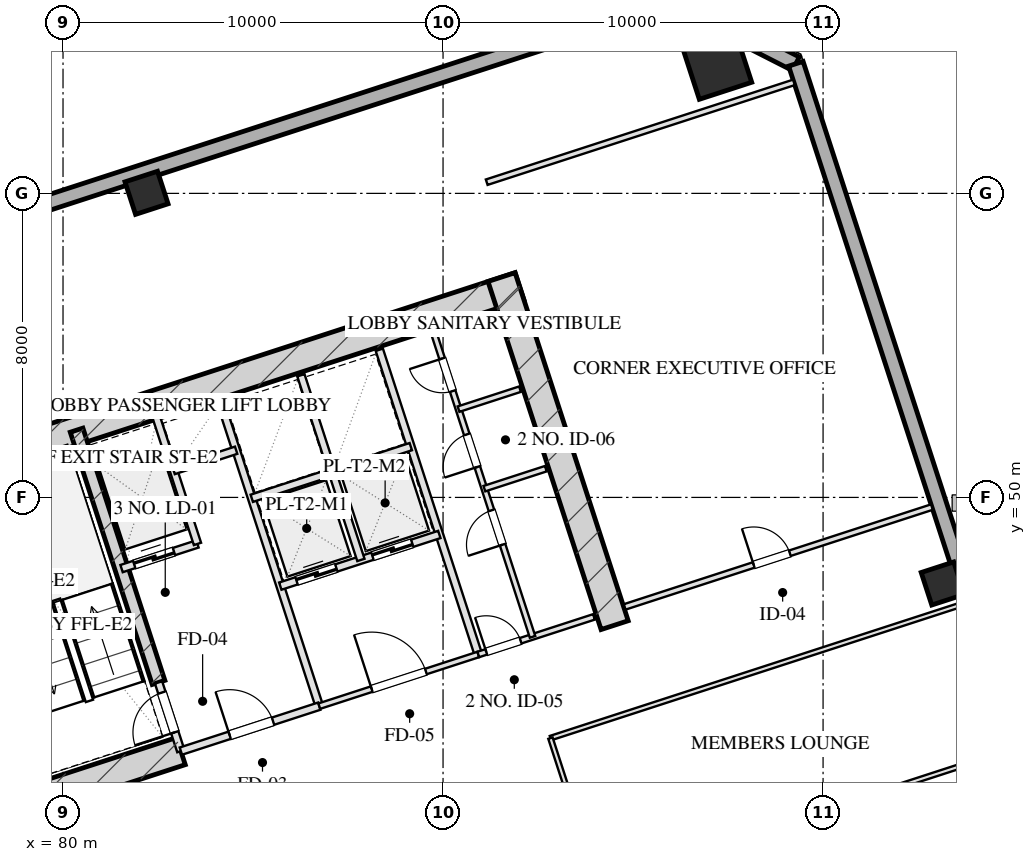
"""IFC4 building model, lengths in metres.
Left out: names, types, materials, properties, quantities, classifications, styles, units other than length and angle.
Written with IfcOpenShell. Run it as: python <this file> out.ifc"""

import sys

from ifc_helpers import new_model, si_unit, direction, frame, frame_2d, origin, origin_2d, place, context, subcontext, project, spatial, rectangle, hollow_rectangle, extrude, element, fill, save


model = new_model("IFC4")
c1 = context("Model", 3, precision=1e-05, world=origin(), true_north=direction((0.0, 1.0)))
c2 = subcontext(c1, "Body", "Model", "MODEL_VIEW")
j1 = project(units=[si_unit("LENGTHUNIT", "METRE"), si_unit("PLANEANGLEUNIT", "RADIAN")], contexts=[c1])
p1 = place(None, origin())
s1 = spatial("IfcSite", under=j1, at=p1, CompositionType="ELEMENT")
p2 = place(p1, origin())
s2 = spatial("IfcBuilding", under=s1, at=p2, CompositionType="ELEMENT")
p3 = place(p2, frame((0.0, 0.0, 88.55)))
s3 = spatial("IfcBuildingStorey", under=s2, at=p3, CompositionType="ELEMENT", Elevation=88.55)
p4 = place(p3, frame((76.272, 50.443, 0.0), z_axis=(0.0, 0.0, 1.0), x_axis=(0.951056072937, 0.309018358888, 0.0)))
e1 = element("IfcWall", 1, at=p4, inside=s3, PredefinedType="SHEAR", context=c2, shape_type="SweptSolid", body=[
    extrude(rectangle(XDim=16.55, YDim=0.75, at=frame_2d((8.275, 0.0))), origin(), (0.0, 0.0, 1.0), 3.45),
])
for number, where, z_axis, x_axis in (
    (2, (79.489, 41.756, 0.0), (0.0, 0.0, 1.0), (-0.309, 0.951, 0.0)),
    (3, (94.515, 46.639, 0.0), (0.0, 0.0, 1.0), (-0.309, 0.951, 0.0)),
):
    element("IfcWall", number, at=place(p3, frame(where, z_axis=z_axis, x_axis=x_axis)), inside=s3, PredefinedType="SHEAR", context=c2, shape_type="SweptSolid", body=[
        extrude(rectangle(XDim=9.63, YDim=0.75, at=frame_2d((4.815, 0.0))), origin(), (0.0, 0.0, 1.0), 3.45),
    ])
p5 = place(p3, frame((82.514, 45.131, 0.0), z_axis=(0.0, 0.0, 1.0), x_axis=(-0.308988790936, 0.951065679686, 0.0)))
e4 = element("IfcWall", 4, at=p5, inside=s3, PredefinedType="SHEAR", context=c2, shape_type="SweptSolid", body=[
    extrude(rectangle(XDim=6.98, YDim=0.35, at=frame_2d((3.49, 0.0))), origin(), (0.0, 0.0, 1.0), 3.45),
])
p6 = place(p3, frame((79.016, 41.997, 0.0), z_axis=(0.0, 0.0, 1.0), x_axis=(0.95106038264, 0.309005094736, 0.0)))
e5 = element("IfcWall", 5, at=p6, inside=s3, PredefinedType="SHEAR", context=c2, shape_type="SweptSolid", body=[
    extrude(rectangle(XDim=4.295, YDim=0.75, at=frame_2d((2.147, 0.0))), origin(), (0.0, 0.0, 1.0), 3.45),
])
p7 = place(p3, frame((97.209, 61.388, 0.0), z_axis=(0.0, 0.0, 1.0), x_axis=(0.951056516295, 0.309016994375, 0.0)))
e6 = element("IfcColumn", 6, at=p7, inside=s3, PredefinedType="COLUMN", context=c2, shape_type="SweptSolid", body=[
    extrude(hollow_rectangle(XDim=1.45, YDim=1.45, WallThickness=0.05, at=origin_2d()), origin(), (0.0, 0.0, 1.0), 3.451),
])
for number, where, z_axis, x_axis in (
    (7, (103.149, 47.736, 0.0), (0.0, 0.0, 1.0), (0.951, 0.309, 0.0)),
    (8, (82.197, 58.014, 0.0), (0.0, 0.0, 1.0), (0.951, 0.309, 0.0)),
):
    element("IfcColumn", number, at=place(p3, frame(where, z_axis=z_axis, x_axis=x_axis)), inside=s3, PredefinedType="COLUMN", context=c2, shape_type="SweptSolid", body=[
        extrude(hollow_rectangle(XDim=0.9, YDim=0.9, WallThickness=0.032, at=origin_2d()), origin(), (0.0, 0.0, 1.0), 3.451),
    ])
p8 = place(p3, frame((80.716, 6.59, 0.0), z_axis=(0.0, 0.0, 1.0), x_axis=(-0.309017542002, 0.95105633836, 0.0)))
e9 = element("IfcWall", 9, at=p8, inside=s3, PredefinedType="SOLIDWALL", context=c2, shape_type="SweptSolid", body=[
    extrude(rectangle(XDim=46.4, YDim=0.4, at=frame_2d((23.2, 0.0))), origin(), (0.0, 0.0, 1.0), 2.55),
])
p9 = place(p8, frame((28.4, 0.0, 0.75)))
e10 = element("IfcOpeningElement", 10, at=p9, cuts=e9, PredefinedType="OPENING", context=c2, shape_type="SweptSolid", body=[
    extrude(rectangle(XDim=2.4, YDim=1.4, at=frame_2d((1.2, 0.7))), frame((0.0, 0.21, 0.0), z_axis=(0.0, -1.0, 0.0), x_axis=(1.0, 0.0, 0.0)), (0.0, 0.0, 1.0), 0.42),
])
p10 = place(p8, frame((19.55, 0.0, 0.0)))
e11 = element("IfcOpeningElement", 11, at=p10, cuts=e9, PredefinedType="OPENING", context=c2, shape_type="SweptSolid", body=[
    extrude(rectangle(XDim=1.1, YDim=2.15, at=frame_2d((0.55, 1.075))), frame((0.0, 0.21, 0.0), z_axis=(0.0, -1.0, 0.0), x_axis=(1.0, 0.0, 0.0)), (0.0, 0.0, 1.0), 0.42),
])
p11 = place(p3, frame((68.047, 53.995, 0.0), z_axis=(0.0, 0.0, 1.0), x_axis=(0.95105505922, 0.309021478754, 0.0)))
e12 = element("IfcWall", 12, at=p11, inside=s3, PredefinedType="SOLIDWALL", context=c2, shape_type="SweptSolid", body=[
    extrude(rectangle(XDim=29.4, YDim=0.4, at=frame_2d((14.7, 0.0))), origin(), (0.0, 0.0, 1.0), 2.55),
])
p12 = place(p3, frame((96.008, 63.08, 0.0), z_axis=(0.0, 0.0, 1.0), x_axis=(0.891001999643, -0.45399937955, 0.0)))
e13 = element("IfcWall", 13, at=p12, inside=s3, PredefinedType="SOLIDWALL", context=c2, shape_type="SweptSolid", body=[
    extrude(rectangle(XDim=3.677, YDim=0.4, at=frame_2d((1.839, 0.0))), origin(), (0.0, 0.0, 1.0), 2.55),
])
p13 = place(p3, frame((99.284, 61.41, 0.0), z_axis=(0.0, 0.0, 1.0), x_axis=(0.309017542002, -0.95105633836, 0.0)))
e14 = element("IfcWall", 14, at=p13, inside=s3, PredefinedType="SOLIDWALL", context=c2, shape_type="SweptSolid", body=[
    extrude(rectangle(XDim=46.4, YDim=0.4, at=frame_2d((23.2, 0.0))), origin(), (0.0, 0.0, 1.0), 2.55),
])
p14 = place(p13, frame((19.4, 0.0, 0.75)))
e15 = element("IfcOpeningElement", 15, at=p14, cuts=e14, PredefinedType="OPENING", context=c2, shape_type="SweptSolid", body=[
    extrude(rectangle(XDim=2.4, YDim=1.4, at=frame_2d((1.2, 0.7))), frame((0.0, 0.21, 0.0), z_axis=(0.0, -1.0, 0.0), x_axis=(1.0, 0.0, 0.0)), (0.0, 0.0, 1.0), 0.42),
])
p15 = place(p13, frame((15.6, 0.0, 0.75)))
e16 = element("IfcOpeningElement", 16, at=p15, cuts=e14, PredefinedType="OPENING", context=c2, shape_type="SweptSolid", body=[
    extrude(rectangle(XDim=2.4, YDim=1.4, at=frame_2d((1.2, 0.7))), frame((0.0, 0.21, 0.0), z_axis=(0.0, -1.0, 0.0), x_axis=(1.0, 0.0, 0.0)), (0.0, 0.0, 1.0), 0.42),
])
p16 = place(p13, frame((27.05, 0.0, 0.0)))
e17 = element("IfcOpeningElement", 17, at=p16, cuts=e14, PredefinedType="OPENING", context=c2, shape_type="SweptSolid", body=[
    extrude(rectangle(XDim=1.1, YDim=2.15, at=frame_2d((0.55, 1.075))), frame((0.0, 0.21, 0.0), z_axis=(0.0, -1.0, 0.0), x_axis=(1.0, 0.0, 0.0)), (0.0, 0.0, 1.0), 0.42),
])
p17 = place(p3, frame((83.101, 43.324, 0.0), z_axis=(0.0, 0.0, 1.0), x_axis=(-0.309048298632, 0.951046344356, 0.0)))
e18 = element("IfcWall", 18, at=p17, inside=s3, PredefinedType="PARTITIONING", context=c2, shape_type="SweptSolid", body=[
    extrude(rectangle(XDim=1.9, YDim=0.2, at=frame_2d((0.95, 0.0))), origin(), (0.0, 0.0, 1.0), 3.155),
])
p18 = place(p17, frame((0.52, 0.0, 0.0)))
e19 = element("IfcOpeningElement", 19, at=p18, cuts=e18, PredefinedType="OPENING", context=c2, shape_type="SweptSolid", body=[
    extrude(rectangle(XDim=1.1, YDim=2.05, at=frame_2d((0.55, 1.025))), frame((0.0, 0.11, 0.0), z_axis=(0.0, -1.0, 0.0), x_axis=(1.0, 0.0, 0.0)), (0.0, 0.0, 1.0), 0.22),
])
p19 = place(p3, frame((86.743, 44.508, 0.0), z_axis=(0.0, 0.0, 1.0), x_axis=(-0.309016001439, 0.951056838919, 0.0)))
e20 = element("IfcWall", 20, at=p19, inside=s3, PredefinedType="PARTITIONING", context=c2, shape_type="SweptSolid", body=[
    extrude(rectangle(XDim=8.43, YDim=0.2, at=frame_2d((4.215, 0.0))), origin(), (0.0, 0.0, 1.0), 3.155),
])
p20 = place(p3, frame((83.101, 43.324, 0.0), z_axis=(0.0, 0.0, 1.0), x_axis=(0.951052804469, 0.309028417967, 0.0)))
e21 = element("IfcWall", 21, at=p20, inside=s3, PredefinedType="PARTITIONING", context=c2, shape_type="SweptSolid", body=[
    extrude(rectangle(XDim=3.83, YDim=0.2, at=frame_2d((1.915, 0.0))), origin(), (0.0, 0.0, 1.0), 3.155),
])
p21 = place(p20, frame((1.35, 0.0, 0.0)))
e22 = element("IfcOpeningElement", 22, at=p21, cuts=e21, PredefinedType="OPENING", context=c2, shape_type="SweptSolid", body=[
    extrude(rectangle(XDim=1.2, YDim=2.05, at=frame_2d((0.6, 1.025))), frame((0.0, 0.11, 0.0), z_axis=(0.0, -1.0, 0.0), x_axis=(1.0, 0.0, 0.0)), (0.0, 0.0, 1.0), 0.22),
])
p22 = place(p3, frame((81.54, 48.127, 0.0), z_axis=(0.0, 0.0, 1.0), x_axis=(0.951062257173, 0.308999325213, 0.0)))
e23 = element("IfcWall", 23, at=p22, inside=s3, PredefinedType="PARTITIONING", context=c2, shape_type="SweptSolid", body=[
    extrude(rectangle(XDim=2.1, YDim=0.2, at=frame_2d((1.05, 0.0))), origin(), (0.0, 0.0, 1.0), 3.155),
])
p23 = place(p22, frame((0.35, 0.0, 0.0)))
e24 = element("IfcOpeningElement", 24, at=p23, cuts=e23, PredefinedType="OPENING", context=c2, shape_type="SweptSolid", body=[
    extrude(rectangle(XDim=1.1, YDim=2.05, at=frame_2d((0.55, 1.025))), frame((0.0, 0.11, 0.0), z_axis=(0.0, -1.0, 0.0), x_axis=(1.0, 0.0, 0.0)), (0.0, 0.0, 1.0), 0.22),
])
p24 = place(p3, frame((83.538, 48.776, 0.0), z_axis=(0.0, 0.0, 1.0), x_axis=(-0.3089935693, 0.951064127245, 0.0)))
e25 = element("IfcWall", 25, at=p24, inside=s3, PredefinedType="PARTITIONING", context=c2, shape_type="SweptSolid", body=[
    extrude(rectangle(XDim=3.7, YDim=0.2, at=frame_2d((1.85, 0.0))), origin(), (0.0, 0.0, 1.0), 3.155),
])
p25 = place(p3, frame((82.91, 50.707, 0.0), z_axis=(0.0, 0.0, 1.0), x_axis=(0.951041328149, 0.309063734775, 0.0)))
e26 = element("IfcWall", 26, at=p25, inside=s3, PredefinedType="PARTITIONING", context=c2, shape_type="SweptSolid", body=[
    extrude(rectangle(XDim=1.73, YDim=0.2, at=frame_2d((0.865, 0.0))), origin(), (0.0, 0.0, 1.0), 3.155),
])
p26 = place(p3, frame((90.928, 45.868, 0.0), z_axis=(0.0, 0.0, 1.0), x_axis=(-0.309042196757, 0.951048327176, 0.0)))
e27 = element("IfcWall", 27, at=p26, inside=s3, PredefinedType="PARTITIONING", context=c2, shape_type="SweptSolid", body=[
    extrude(rectangle(XDim=8.43, YDim=0.2, at=frame_2d((4.215, 0.0))), origin(), (0.0, 0.0, 1.0), 3.155),
])
p27 = place(p3, frame((86.743, 44.508, 0.0), z_axis=(0.0, 0.0, 1.0), x_axis=(0.951063829732, 0.308994485023, 0.0)))
e28 = element("IfcWall", 28, at=p27, inside=s3, PredefinedType="PARTITIONING", context=c2, shape_type="SweptSolid", body=[
    extrude(rectangle(XDim=4.4, YDim=0.15, at=frame_2d((2.2, 0.0))), origin(), (0.0, 0.0, 1.0), 3.155),
])
p28 = place(p27, frame((1.45, 0.0, 0.0)))
e29 = element("IfcOpeningElement", 29, at=p28, cuts=e28, PredefinedType="OPENING", context=c2, shape_type="SweptSolid", body=[
    extrude(rectangle(XDim=1.5, YDim=2.05, at=frame_2d((0.75, 1.025))), frame((0.0, 0.085, 0.0), z_axis=(0.0, -1.0, 0.0), x_axis=(1.0, 0.0, 0.0)), (0.0, 0.0, 1.0), 0.17),
])
p29 = place(p3, frame((85.718, 47.666, 0.0), z_axis=(0.0, 0.0, 1.0), x_axis=(0.951058531764, 0.30901079133, 0.0)))
e30 = element("IfcWall", 30, at=p29, inside=s3, PredefinedType="PARTITIONING", context=c2, shape_type="SweptSolid", body=[
    extrude(rectangle(XDim=4.4, YDim=0.2, at=frame_2d((2.2, 0.0))), origin(), (0.0, 0.0, 1.0), 3.155),
])
p30 = place(p29, frame((0.45, 0.0, 0.0)))
e31 = element("IfcOpeningElement", 31, at=p30, cuts=e30, PredefinedType="OPENING", context=c2, shape_type="SweptSolid", body=[
    extrude(rectangle(XDim=1.1, YDim=2.05, at=frame_2d((0.55, 1.025))), frame((0.0, 0.11, 0.0), z_axis=(0.0, -1.0, 0.0), x_axis=(1.0, 0.0, 0.0)), (0.0, 0.0, 1.0), 0.22),
])
p31 = place(p29, frame((2.55, 0.0, 0.0)))
e32 = element("IfcOpeningElement", 32, at=p31, cuts=e30, PredefinedType="OPENING", context=c2, shape_type="SweptSolid", body=[
    extrude(rectangle(XDim=1.1, YDim=2.05, at=frame_2d((0.55, 1.025))), frame((0.0, 0.11, 0.0), z_axis=(0.0, -1.0, 0.0), x_axis=(1.0, 0.0, 0.0)), (0.0, 0.0, 1.0), 0.22),
])
p32 = place(p3, frame((87.838, 48.354, 0.0), z_axis=(0.0, 0.0, 1.0), x_axis=(-0.3090093719, 0.951058992953, 0.0)))
e33 = element("IfcWall", 33, at=p32, inside=s3, PredefinedType="PARTITIONING", context=c2, shape_type="SweptSolid", body=[
    extrude(rectangle(XDim=5.11, YDim=0.2, at=frame_2d((2.555, 0.0))), origin(), (0.0, 0.0, 1.0), 3.155),
])
p33 = place(p3, frame((84.967, 49.977, 0.0), z_axis=(0.0, 0.0, 1.0), x_axis=(0.951063829732, 0.308994485023, 0.0)))
e34 = element("IfcWall", 34, at=p33, inside=s3, PredefinedType="PARTITIONING", context=c2, shape_type="SweptSolid", body=[
    extrude(rectangle(XDim=4.4, YDim=0.2, at=frame_2d((2.2, 0.0))), origin(), (0.0, 0.0, 1.0), 3.155),
])
p34 = place(p3, frame((90.928, 45.868, 0.0), z_axis=(0.0, 0.0, 1.0), x_axis=(0.951059297078, 0.309008435874, 0.0)))
e35 = element("IfcWall", 35, at=p34, inside=s3, PredefinedType="PARTITIONING", context=c2, shape_type="SweptSolid", body=[
    extrude(rectangle(XDim=3.2, YDim=0.15, at=frame_2d((1.6, 0.0))), origin(), (0.0, 0.0, 1.0), 3.155),
])
p35 = place(p34, frame((0.22, 0.0, 0.0)))
e36 = element("IfcOpeningElement", 36, at=p35, cuts=e35, PredefinedType="OPENING", context=c2, shape_type="SweptSolid", body=[
    extrude(rectangle(XDim=0.95, YDim=2.05, at=frame_2d((0.475, 1.025))), frame((0.0, 0.085, 0.0), z_axis=(0.0, -1.0, 0.0), x_axis=(1.0, 0.0, 0.0)), (0.0, 0.0, 1.0), 0.17),
])
p36 = place(p3, frame((92.355, 46.331, 0.0), z_axis=(0.0, 0.0, 1.0), x_axis=(-0.309007490203, 0.951059604335, 0.0)))
e37 = element("IfcWall", 37, at=p36, inside=s3, PredefinedType="PARTITIONING", context=c2, shape_type="SweptSolid", body=[
    extrude(rectangle(XDim=8.43, YDim=0.15, at=frame_2d((4.215, 0.0))), origin(), (0.0, 0.0, 1.0), 3.155),
])
p37 = place(p36, frame((2.55, 0.0, 0.0)))
e38 = element("IfcOpeningElement", 38, at=p37, cuts=e37, PredefinedType="OPENING", context=c2, shape_type="SweptSolid", body=[
    extrude(rectangle(XDim=0.95, YDim=2.05, at=frame_2d((0.475, 1.025))), frame((0.0, 0.085, 0.0), z_axis=(0.0, -1.0, 0.0), x_axis=(1.0, 0.0, 0.0)), (0.0, 0.0, 1.0), 0.17),
])
p38 = place(p36, frame((4.7, 0.0, 0.0)))
e39 = element("IfcOpeningElement", 39, at=p38, cuts=e37, PredefinedType="OPENING", context=c2, shape_type="SweptSolid", body=[
    extrude(rectangle(XDim=0.9, YDim=2.05, at=frame_2d((0.45, 1.025))), frame((0.0, 0.085, 0.0), z_axis=(0.0, -1.0, 0.0), x_axis=(1.0, 0.0, 0.0)), (0.0, 0.0, 1.0), 0.17),
])
p39 = place(p36, frame((6.8, 0.0, 0.0)))
e40 = element("IfcOpeningElement", 40, at=p39, cuts=e37, PredefinedType="OPENING", context=c2, shape_type="SweptSolid", body=[
    extrude(rectangle(XDim=0.9, YDim=2.05, at=frame_2d((0.45, 1.025))), frame((0.0, 0.085, 0.0), z_axis=(0.0, -1.0, 0.0), x_axis=(1.0, 0.0, 0.0)), (0.0, 0.0, 1.0), 0.17),
])
p40 = place(p3, frame((91.088, 50.23, 0.0), z_axis=(0.0, 0.0, 1.0), x_axis=(0.951054116971, 0.309024378638, 0.0)))
e41 = element("IfcWall", 41, at=p40, inside=s3, PredefinedType="PARTITIONING", context=c2, shape_type="SweptSolid", body=[
    extrude(rectangle(XDim=1.7, YDim=0.15, at=frame_2d((0.85, 0.0))), origin(), (0.0, 0.0, 1.0), 3.155),
])
p41 = place(p3, frame((90.408, 52.323, 0.0), z_axis=(0.0, 0.0, 1.0), x_axis=(0.951040401051, 0.309066587596, 0.0)))
e42 = element("IfcWall", 42, at=p41, inside=s3, PredefinedType="PARTITIONING", context=c2, shape_type="SweptSolid", body=[
    extrude(rectangle(XDim=1.7, YDim=0.15, at=frame_2d((0.85, 0.0))), origin(), (0.0, 0.0, 1.0), 3.155),
])
p42 = place(p3, frame((91.149, 58.294, 0.0), z_axis=(0.0, 0.0, 1.0), x_axis=(0.951062770994, 0.308997743729, 0.0)))
e43 = element("IfcWall", 43, at=p42, inside=s3, PredefinedType="PARTITIONING", context=c2, shape_type="SweptSolid", body=[
    extrude(rectangle(XDim=8.5, YDim=0.15, at=frame_2d((4.25, 0.0))), origin(), (0.0, 0.0, 1.0), 3.155),
])
p43 = place(p3, frame((94.78, 47.119, 0.0), z_axis=(0.0, 0.0, 1.0), x_axis=(0.951054329824, 0.309023723562, 0.0)))
e44 = element("IfcWall", 44, at=p43, inside=s3, PredefinedType="PARTITIONING", context=c2, shape_type="SweptSolid", body=[
    extrude(rectangle(XDim=8.5, YDim=0.15, at=frame_2d((4.25, 0.0))), origin(), (0.0, 0.0, 1.0), 3.155),
])
p44 = place(p43, frame((3.57, 0.0, 0.0)))
e45 = element("IfcOpeningElement", 45, at=p44, cuts=e44, PredefinedType="OPENING", context=c2, shape_type="SweptSolid", body=[
    extrude(rectangle(XDim=1.0, YDim=2.05, at=frame_2d((0.5, 1.025))), frame((0.0, 0.085, 0.0), z_axis=(0.0, -1.0, 0.0), x_axis=(1.0, 0.0, 0.0)), (0.0, 0.0, 1.0), 0.17),
])
p45 = place(p3, frame((92.826, 43.667, 0.0), z_axis=(0.0, 0.0, 1.0), x_axis=(0.951057778088, 0.309013110947, 0.0)))
e46 = element("IfcWall", 46, at=p45, inside=s3, PredefinedType="PARTITIONING", context=c2, shape_type="SweptSolid", body=[
    extrude(rectangle(XDim=11.425, YDim=0.12, at=frame_2d((5.712, 0.0))), origin(), (0.0, 0.0, 1.0), 3.155),
])
p46 = place(p3, frame((97.968, 27.841, 0.0), z_axis=(0.0, 0.0, 1.0), x_axis=(-0.30901773025, 0.951056277195, 0.0)))
e47 = element("IfcWall", 47, at=p46, inside=s3, PredefinedType="PARTITIONING", context=c2, shape_type="SweptSolid", body=[
    extrude(rectangle(XDim=16.64, YDim=0.12, at=frame_2d((8.32, 0.0))), origin(), (0.0, 0.0, 1.0), 3.155),
])
p47 = place(p46, frame((3.06, 0.0, 0.0)))
e48 = element("IfcOpeningElement", 48, at=p47, cuts=e47, PredefinedType="OPENING", context=c2, shape_type="SweptSolid", body=[
    extrude(rectangle(XDim=1.0, YDim=2.05, at=frame_2d((0.5, 1.025))), frame((0.0, 0.07, 0.0), z_axis=(0.0, -1.0, 0.0), x_axis=(1.0, 0.0, 0.0)), (0.0, 0.0, 1.0), 0.14),
])
p48 = place(p46, frame((9.363, 0.0, 0.0)))
e49 = element("IfcOpeningElement", 49, at=p48, cuts=e47, PredefinedType="OPENING", context=c2, shape_type="SweptSolid", body=[
    extrude(rectangle(XDim=1.0, YDim=2.05, at=frame_2d((0.5, 1.025))), frame((0.0, 0.07, 0.0), z_axis=(0.0, -1.0, 0.0), x_axis=(1.0, 0.0, 0.0)), (0.0, 0.0, 1.0), 0.14),
])
p49 = place(p46, frame((14.123, 0.0, 0.0)))
e50 = element("IfcOpeningElement", 50, at=p49, cuts=e47, PredefinedType="OPENING", context=c2, shape_type="SweptSolid", body=[
    extrude(rectangle(XDim=1.0, YDim=2.05, at=frame_2d((0.5, 1.025))), frame((0.0, 0.07, 0.0), z_axis=(0.0, -1.0, 0.0), x_axis=(1.0, 0.0, 0.0)), (0.0, 0.0, 1.0), 0.14),
])
p50 = place(p3, frame((94.073, 39.829, 0.0), z_axis=(0.0, 0.0, 1.0), x_axis=(0.951057778088, 0.309013110947, 0.0)))
e51 = element("IfcWall", 51, at=p50, inside=s3, PredefinedType="PARTITIONING", context=c2, shape_type="SweptSolid", body=[
    extrude(rectangle(XDim=11.425, YDim=0.12, at=frame_2d((5.712, 0.0))), origin(), (0.0, 0.0, 1.0), 3.155),
])
p51 = place(p18, origin())
e52 = element("IfcDoor", 52, at=p51, inside=s3, OperationType="SINGLE_SWING_LEFT", PredefinedType="DOOR", context=c2, shape_type="SweptSolid", body=[
    extrude(rectangle(XDim=1.1, YDim=2.05, at=frame_2d((0.55, 1.025))), frame((0.0, 0.025, 0.0), z_axis=(0.0, -1.0, 0.0), x_axis=(1.0, 0.0, 0.0)), (0.0, 0.0, 1.0), 0.05),
])
fill(e19, e52)
p52 = place(p21, origin())
e53 = element("IfcDoor", 53, at=p52, inside=s3, OperationType="SINGLE_SWING_LEFT", PredefinedType="DOOR", context=c2, shape_type="SweptSolid", body=[
    extrude(rectangle(XDim=1.2, YDim=2.05, at=frame_2d((0.6, 1.025))), frame((0.0, 0.025, 0.0), z_axis=(0.0, -1.0, 0.0), x_axis=(1.0, 0.0, 0.0)), (0.0, 0.0, 1.0), 0.05),
])
fill(e22, e53)
p53 = place(p23, origin())
e54 = element("IfcDoor", 54, at=p53, inside=s3, OperationType="DOUBLE_DOOR_SLIDING", PredefinedType="DOOR", context=c2, shape_type="SweptSolid", body=[
    extrude(rectangle(XDim=1.1, YDim=2.05, at=frame_2d((0.55, 1.025))), frame((0.0, 0.025, 0.0), z_axis=(0.0, -1.0, 0.0), x_axis=(1.0, 0.0, 0.0)), (0.0, 0.0, 1.0), 0.05),
])
fill(e24, e54)
p54 = place(p28, origin())
e55 = element("IfcDoor", 55, at=p54, inside=s3, OperationType="SINGLE_SWING_LEFT", PredefinedType="DOOR", context=c2, shape_type="SweptSolid", body=[
    extrude(rectangle(XDim=1.5, YDim=2.05, at=frame_2d((0.75, 1.025))), frame((0.0, 0.025, 0.0), z_axis=(0.0, -1.0, 0.0), x_axis=(1.0, 0.0, 0.0)), (0.0, 0.0, 1.0), 0.05),
])
fill(e29, e55)
p55 = place(p30, origin())
e56 = element("IfcDoor", 56, at=p55, inside=s3, OperationType="DOUBLE_DOOR_SLIDING", PredefinedType="DOOR", context=c2, shape_type="SweptSolid", body=[
    extrude(rectangle(XDim=1.1, YDim=2.05, at=frame_2d((0.55, 1.025))), frame((0.0, 0.025, 0.0), z_axis=(0.0, -1.0, 0.0), x_axis=(1.0, 0.0, 0.0)), (0.0, 0.0, 1.0), 0.05),
])
fill(e31, e56)
p56 = place(p31, origin())
e57 = element("IfcDoor", 57, at=p56, inside=s3, OperationType="DOUBLE_DOOR_SLIDING", PredefinedType="DOOR", context=c2, shape_type="SweptSolid", body=[
    extrude(rectangle(XDim=1.1, YDim=2.05, at=frame_2d((0.55, 1.025))), frame((0.0, 0.025, 0.0), z_axis=(0.0, -1.0, 0.0), x_axis=(1.0, 0.0, 0.0)), (0.0, 0.0, 1.0), 0.05),
])
fill(e32, e57)
p57 = place(p35, origin())
e58 = element("IfcDoor", 58, at=p57, inside=s3, OperationType="SINGLE_SWING_LEFT", PredefinedType="DOOR", context=c2, shape_type="SweptSolid", body=[
    extrude(rectangle(XDim=0.95, YDim=2.05, at=frame_2d((0.475, 1.025))), frame((0.0, 0.025, 0.0), z_axis=(0.0, -1.0, 0.0), x_axis=(1.0, 0.0, 0.0)), (0.0, 0.0, 1.0), 0.05),
])
fill(e36, e58)
p58 = place(p37, origin())
e59 = element("IfcDoor", 59, at=p58, inside=s3, OperationType="SINGLE_SWING_LEFT", PredefinedType="DOOR", context=c2, shape_type="SweptSolid", body=[
    extrude(rectangle(XDim=0.95, YDim=2.05, at=frame_2d((0.475, 1.025))), frame((0.0, 0.025, 0.0), z_axis=(0.0, -1.0, 0.0), x_axis=(1.0, 0.0, 0.0)), (0.0, 0.0, 1.0), 0.05),
])
fill(e38, e59)
p59 = place(p38, origin())
e60 = element("IfcDoor", 60, at=p59, inside=s3, OperationType="SINGLE_SWING_LEFT", PredefinedType="DOOR", context=c2, shape_type="SweptSolid", body=[
    extrude(rectangle(XDim=0.9, YDim=2.05, at=frame_2d((0.45, 1.025))), frame((0.0, 0.025, 0.0), z_axis=(0.0, -1.0, 0.0), x_axis=(1.0, 0.0, 0.0)), (0.0, 0.0, 1.0), 0.05),
])
fill(e39, e60)
p60 = place(p39, origin())
e61 = element("IfcDoor", 61, at=p60, inside=s3, OperationType="SINGLE_SWING_RIGHT", PredefinedType="DOOR", context=c2, shape_type="SweptSolid", body=[
    extrude(rectangle(XDim=0.9, YDim=2.05, at=frame_2d((0.45, 1.025))), frame((0.0, 0.025, 0.0), z_axis=(0.0, -1.0, 0.0), x_axis=(1.0, 0.0, 0.0)), (0.0, 0.0, 1.0), 0.05),
])
fill(e40, e61)
p61 = place(p44, origin())
e62 = element("IfcDoor", 62, at=p61, inside=s3, OperationType="SINGLE_SWING_LEFT", PredefinedType="DOOR", context=c2, shape_type="SweptSolid", body=[
    extrude(rectangle(XDim=1.0, YDim=2.05, at=frame_2d((0.5, 1.025))), frame((0.0, 0.025, 0.0), z_axis=(0.0, -1.0, 0.0), x_axis=(1.0, 0.0, 0.0)), (0.0, 0.0, 1.0), 0.05),
])
fill(e45, e62)
save(model, sys.argv[1])
